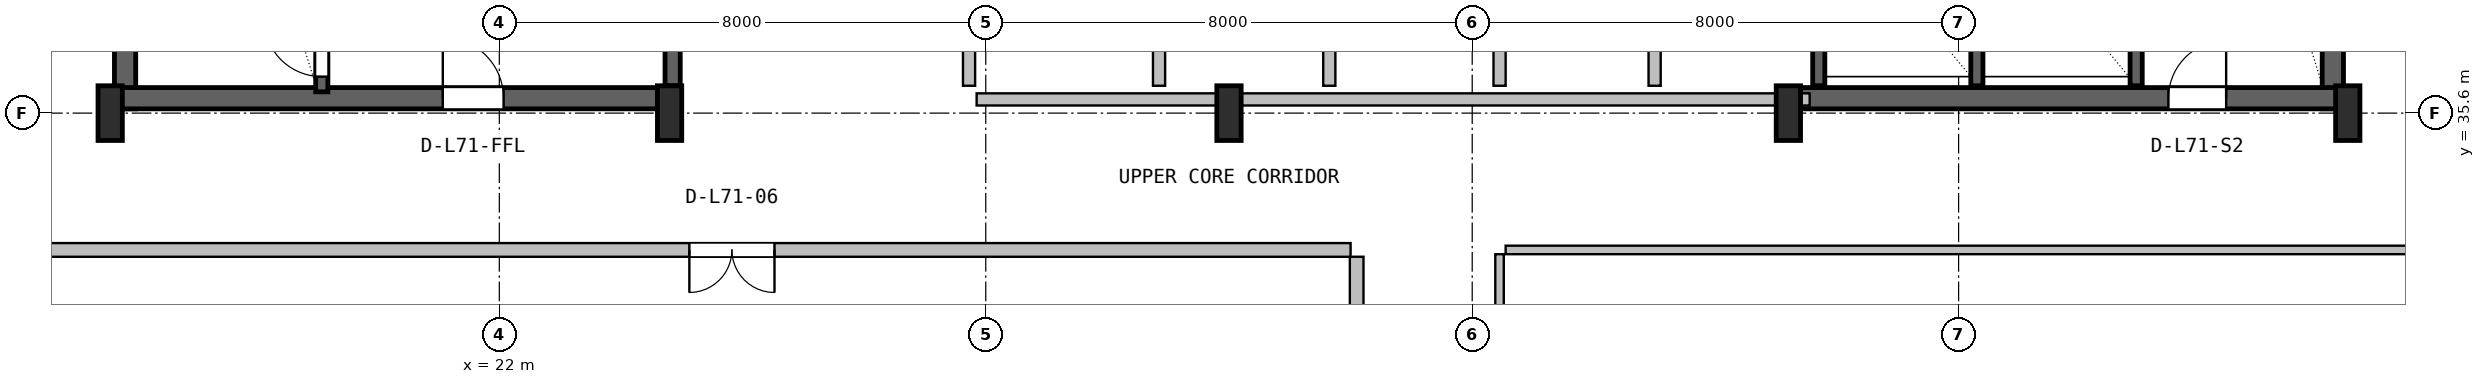
"""IFC4 building model, lengths in metres.
Left out: names, types, materials, properties, quantities, classifications, styles, units other than length and angle.
Written with IfcOpenShell. Run it as: python <this file> out.ifc"""

import sys

from ifc_helpers import new_model, si_unit, direction, frame, frame_2d, origin, origin_2d, place, context, subcontext, project, spatial, rectangle, i_section, extrude, source, transform, mapped, element, fill, save


model = new_model("IFC4")
c1 = context("Model", 3, precision=1e-05, world=origin(), true_north=direction((0.0, 1.0)))
c2 = subcontext(c1, "Body", "Model", "MODEL_VIEW")
j1 = project(units=[si_unit("LENGTHUNIT", "METRE"), si_unit("PLANEANGLEUNIT", "RADIAN")], contexts=[c1])
p1 = place(None, origin())
s1 = spatial("IfcSite", under=j1, at=p1, CompositionType="ELEMENT")
p2 = place(p1, origin())
s2 = spatial("IfcBuilding", under=s1, at=p2, CompositionType="ELEMENT")
p3 = place(p2, frame((0.0, 0.0, 285.0)))
s3 = spatial("IfcBuildingStorey", under=s2, at=p3, CompositionType="ELEMENT", Elevation=285.0)
for number, where, z_axis, x_axis in (
    (1, (15.845, 35.67, 0.0), (0.0, 0.0, 1.0), (0.0, 1.0, 0.0)),
    (2, (52.155, 35.67, 0.0), (0.0, 0.0, 1.0), (0.0, 1.0, 0.0)),
):
    element("IfcWall", number, at=place(p3, frame(where, z_axis=z_axis, x_axis=x_axis)), inside=s3, PredefinedType="SHEAR", context=c2, shape_type="SweptSolid", body=[
        extrude(rectangle(XDim=11.13, YDim=0.35, at=frame_2d((5.565, 0.0))), origin(), (0.0, 0.0, 1.0), 3.55),
    ])
p4 = place(p3, frame((15.67, 35.845, 0.0), z_axis=(0.0, 0.0, 1.0), x_axis=(1.0, 0.0, 0.0)))
e3 = element("IfcWall", 3, at=p4, inside=s3, PredefinedType="SHEAR", context=c2, shape_type="SweptSolid", body=[
    extrude(rectangle(XDim=9.13, YDim=0.35, at=frame_2d((4.565, 0.0))), origin(), (0.0, 0.0, 1.0), 3.55),
])
p5 = place(p4, frame((5.4, 0.0, 0.0)))
e4 = element("IfcOpeningElement", 4, at=p5, cuts=e3, PredefinedType="OPENING", context=c2, shape_type="SweptSolid", body=[
    extrude(rectangle(XDim=1.0, YDim=2.1, at=frame_2d((0.5, 1.05))), frame((0.0, 0.185, 0.0), z_axis=(0.0, -1.0, 0.0), x_axis=(1.0, 0.0, 0.0)), (0.0, 0.0, 1.0), 0.37),
])
p6 = place(p3, frame((43.2, 35.845, 0.0), z_axis=(0.0, 0.0, 1.0), x_axis=(1.0, 0.0, 0.0)))
e5 = element("IfcWall", 5, at=p6, inside=s3, PredefinedType="SHEAR", context=c2, shape_type="SweptSolid", body=[
    extrude(rectangle(XDim=9.13, YDim=0.35, at=frame_2d((4.565, 0.0))), origin(), (0.0, 0.0, 1.0), 3.55),
])
p7 = place(p6, frame((6.25, 0.0, 0.0)))
e6 = element("IfcOpeningElement", 6, at=p7, cuts=e5, PredefinedType="OPENING", context=c2, shape_type="SweptSolid", body=[
    extrude(rectangle(XDim=0.95, YDim=2.1, at=frame_2d((0.475, 1.05))), frame((0.0, 0.185, 0.0), z_axis=(0.0, -1.0, 0.0), x_axis=(1.0, 0.0, 0.0)), (0.0, 0.0, 1.0), 0.37),
])
m1 = source(origin(), c2, "Body", "SweptSolid", [
    extrude(i_section(OverallWidth=0.4, OverallDepth=0.9, WebThickness=0.016, FlangeThickness=0.028, FilletRadius=0.016, at=origin_2d()), origin(), (0.0, 0.0, 1.0), 3.8),
])
for number, where, z_axis, x_axis in (
    (7, (15.6, 35.6, 0.0), (0.0, 0.0, 1.0), (1.0, 0.0, 0.0)),
    (8, (24.8, 35.6, 0.0), (0.0, 0.0, 1.0), (1.0, 0.0, 0.0)),
    (9, (34.0, 35.6, 0.0), (0.0, 0.0, 1.0), (1.0, 0.0, 0.0)),
    (10, (43.2, 35.6, 0.0), (0.0, 0.0, 1.0), (1.0, 0.0, 0.0)),
    (11, (52.4, 35.6, 0.0), (0.0, 0.0, 1.0), (1.0, 0.0, 0.0)),
):
    element("IfcColumn", number, at=place(p3, frame(where, z_axis=z_axis, x_axis=x_axis)), inside=s3, PredefinedType="COLUMN", context=c2, shape_type="MappedRepresentation", body=[
        mapped(m1, transform((0.0, 0.0, 0.0), x_axis=(1.0, 0.0, 0.0), y_axis=(0.0, 1.0, 0.0), z_axis=(0.0, 0.0, 1.0), scale=1.0)),
    ])
p8 = place(p3, frame((19.08, 35.95, 0.0), z_axis=(0.0, 0.0, 1.0), x_axis=(0.0, 1.0, 0.0)))
e12 = element("IfcWall", 12, at=p8, inside=s3, PredefinedType="SHEAR", context=c2, shape_type="SweptSolid", body=[
    extrude(rectangle(XDim=9.65, YDim=0.2, at=frame_2d((4.825, 0.0))), origin(), (0.0, 0.0, 1.0), 3.55),
])
p9 = place(p8, frame((0.25, 0.0, 0.0)))
e13 = element("IfcOpeningElement", 13, at=p9, cuts=e12, PredefinedType="OPENING", context=c2, shape_type="SweptSolid", body=[
    extrude(rectangle(XDim=0.95, YDim=2.1, at=frame_2d((0.475, 1.05))), frame((0.0, 0.11, 0.0), z_axis=(0.0, -1.0, 0.0), x_axis=(1.0, 0.0, 0.0)), (0.0, 0.0, 1.0), 0.22),
])
p10 = place(p3, frame((24.85, 36.05, 0.0), z_axis=(0.0, 0.0, 1.0), x_axis=(0.0, 1.0, 0.0)))
e14 = element("IfcWall", 14, at=p10, inside=s3, PredefinedType="SHEAR", context=c2, shape_type="SweptSolid", body=[
    extrude(rectangle(XDim=10.45, YDim=0.25, at=frame_2d((5.225, 0.0))), origin(), (0.0, 0.0, 1.0), 3.55),
])
p11 = place(p3, frame((48.92, 36.05, 0.0), z_axis=(0.0, 0.0, 1.0), x_axis=(0.0, 1.0, 0.0)))
e15 = element("IfcWall", 15, at=p11, inside=s3, PredefinedType="SHEAR", context=c2, shape_type="SweptSolid", body=[
    extrude(rectangle(XDim=10.5, YDim=0.2, at=frame_2d((5.25, 0.0))), origin(), (0.0, 0.0, 1.0), 3.55),
])
for number, where, z_axis, x_axis in (
    (16, (43.7, 36.05, 0.0), (0.0, 0.0, 1.0), (0.0, 1.0, 0.0)),
    (17, (46.3, 36.05, 0.0), (0.0, 0.0, 1.0), (0.0, 1.0, 0.0)),
):
    element("IfcWall", number, at=place(p3, frame(where, z_axis=z_axis, x_axis=x_axis)), inside=s3, PredefinedType="SHEAR", context=c2, shape_type="SweptSolid", body=[
        extrude(rectangle(XDim=3.05, YDim=0.2, at=frame_2d((1.525, 0.0))), origin(), (0.0, 0.0, 1.0), 3.55),
    ])
p12 = place(p3, frame((29.85, 35.825, 0.0), z_axis=(0.0, 0.0, 1.0), x_axis=(1.0, 0.0, 0.0)))
e18 = element("IfcWall", 18, at=p12, inside=s3, PredefinedType="SOLIDWALL", context=c2, shape_type="SweptSolid", body=[
    extrude(rectangle(XDim=13.7, YDim=0.2, at=frame_2d((6.85, 0.0))), origin(), (0.0, 0.0, 1.0), 2.575),
])
for number, where, z_axis, x_axis in (
    (19, (32.85, 36.05, 0.0), (0.0, 0.0, 1.0), (0.0, 1.0, 0.0)),
    (20, (29.725, 36.05, 0.0), (0.0, 0.0, 1.0), (0.0, 1.0, 0.0)),
    (21, (35.65, 36.05, 0.0), (0.0, 0.0, 1.0), (0.0, 1.0, 0.0)),
    (22, (38.45, 36.05, 0.0), (0.0, 0.0, 1.0), (0.0, 1.0, 0.0)),
):
    element("IfcWall", number, at=place(p3, frame(where, z_axis=z_axis, x_axis=x_axis)), inside=s3, PredefinedType="PLUMBINGWALL", context=c2, shape_type="SweptSolid", body=[
        extrude(rectangle(XDim=3.1, YDim=0.2, at=frame_2d((1.55, 0.0))), origin(), (0.0, 0.0, 1.0), 3.53),
    ])
p13 = place(p3, frame((41.0, 36.05, 0.0), z_axis=(0.0, 0.0, 1.0), x_axis=(0.0, 1.0, 0.0)))
e23 = element("IfcWall", 23, at=p13, inside=s3, PredefinedType="SOLIDWALL", context=c2, shape_type="SweptSolid", body=[
    extrude(rectangle(XDim=3.1, YDim=0.2, at=frame_2d((1.55, 0.0))), origin(), (0.0, 0.0, 1.0), 3.53),
])
p14 = place(p3, frame((36.1, 13.38, 0.0), z_axis=(0.0, 0.0, 1.0), x_axis=(0.0, 1.0, 0.0)))
e24 = element("IfcWall", 24, at=p14, inside=s3, PredefinedType="PARTITIONING", context=c2, shape_type="SweptSolid", body=[
    extrude(rectangle(XDim=19.858, YDim=0.225, at=frame_2d((9.929, 0.0))), origin(), (0.0, 0.0, 1.0), 2.981),
])
p15 = place(p3, frame((12.18, 33.35, 0.0), z_axis=(0.0, 0.0, 1.0), x_axis=(1.0, 0.0, 0.0)))
e25 = element("IfcWall", 25, at=p15, inside=s3, PredefinedType="PARTITIONING", context=c2, shape_type="SweptSolid", body=[
    extrude(rectangle(XDim=23.82, YDim=0.225, at=frame_2d((11.91, 0.0))), origin(), (0.0, 0.0, 1.0), 2.981),
])
p16 = place(p15, frame((12.945, 0.0, 0.0)))
e26 = element("IfcOpeningElement", 26, at=p16, cuts=e25, PredefinedType="OPENING", context=c2, shape_type="SweptSolid", body=[
    extrude(rectangle(XDim=1.4, YDim=2.12, at=frame_2d((0.7, 1.06))), frame((0.0, 0.123, 0.0), z_axis=(0.0, -1.0, 0.0), x_axis=(1.0, 0.0, 0.0)), (0.0, 0.0, 1.0), 0.245),
])
p17 = place(p3, frame((38.55, 33.35, 0.0), z_axis=(0.0, 0.0, 1.0), x_axis=(1.0, 0.0, 0.0)))
e27 = element("IfcWall", 27, at=p17, inside=s3, PredefinedType="PARTITIONING", context=c2, shape_type="SweptSolid", body=[
    extrude(rectangle(XDim=17.27, YDim=0.14, at=frame_2d((8.635, 0.0))), origin(), (0.0, 0.0, 1.0), 2.981),
])
p18 = place(p3, frame((38.45, 29.72, 0.0), z_axis=(0.0, 0.0, 1.0), x_axis=(0.0, 1.0, 0.0)))
e28 = element("IfcWall", 28, at=p18, inside=s3, PredefinedType="PARTITIONING", context=c2, shape_type="SweptSolid", body=[
    extrude(rectangle(XDim=3.56, YDim=0.14, at=frame_2d((1.78, 0.0))), origin(), (0.0, 0.0, 1.0), 3.53),
])
m2 = source(origin(), c2, "Body", "SweptSolid", [
    extrude(rectangle(XDim=0.95, YDim=2.1, at=frame_2d((0.475, 1.05))), frame((0.0, 0.025, 0.0), z_axis=(0.0, -1.0, 0.0), x_axis=(1.0, 0.0, 0.0)), (0.0, 0.0, 1.0), 0.05),
])
p19 = place(p9, origin())
e29 = element("IfcDoor", 29, at=p19, inside=s3, OperationType="SINGLE_SWING_RIGHT", PredefinedType="DOOR", context=c2, shape_type="MappedRepresentation", body=[
    mapped(m2, transform((0.0, 0.0, 0.0), x_axis=(1.0, 0.0, 0.0), y_axis=(0.0, 1.0, 0.0), z_axis=(0.0, 0.0, 1.0), scale=1.0)),
])
fill(e13, e29)
m3 = source(origin(), c2, "Body", "SweptSolid", [
    extrude(rectangle(XDim=1.0, YDim=2.1, at=frame_2d((0.5, 1.05))), frame((0.0, 0.025, 0.0), z_axis=(0.0, -1.0, 0.0), x_axis=(1.0, 0.0, 0.0)), (0.0, 0.0, 1.0), 0.05),
])
p20 = place(p5, origin())
e30 = element("IfcDoor", 30, at=p20, inside=s3, OperationType="SINGLE_SWING_LEFT", PredefinedType="DOOR", context=c2, shape_type="MappedRepresentation", body=[
    mapped(m3, transform((0.0, 0.0, 0.0), x_axis=(1.0, 0.0, 0.0), y_axis=(0.0, 1.0, 0.0), z_axis=(0.0, 0.0, 1.0), scale=1.0)),
])
fill(e4, e30)
p21 = place(p7, origin())
e31 = element("IfcDoor", 31, at=p21, inside=s3, OperationType="SINGLE_SWING_RIGHT", PredefinedType="DOOR", context=c2, shape_type="MappedRepresentation", body=[
    mapped(m2, transform((0.0, 0.0, 0.0), x_axis=(1.0, 0.0, 0.0), y_axis=(0.0, 1.0, 0.0), z_axis=(0.0, 0.0, 1.0), scale=1.0)),
])
fill(e6, e31)
m4 = source(origin(), c2, "Body", "SweptSolid", [
    extrude(rectangle(XDim=1.4, YDim=2.12, at=frame_2d((0.7, 1.06))), frame((0.0, 0.025, 0.0), z_axis=(0.0, -1.0, 0.0), x_axis=(1.0, 0.0, 0.0)), (0.0, 0.0, 1.0), 0.05),
])
p22 = place(p16, frame((1.4, 0.0, 0.0), z_axis=(0.0, 0.0, 1.0), x_axis=(-1.0, 0.0, 0.0)))
e32 = element("IfcDoor", 32, at=p22, inside=s3, OperationType="DOUBLE_DOOR_SINGLE_SWING", PredefinedType="DOOR", context=c2, shape_type="MappedRepresentation", body=[
    mapped(m4, transform((0.0, 0.0, 0.0), x_axis=(1.0, 0.0, 0.0), y_axis=(0.0, 1.0, 0.0), z_axis=(0.0, 0.0, 1.0), scale=1.0)),
])
fill(e26, e32)
save(model, sys.argv[1])
